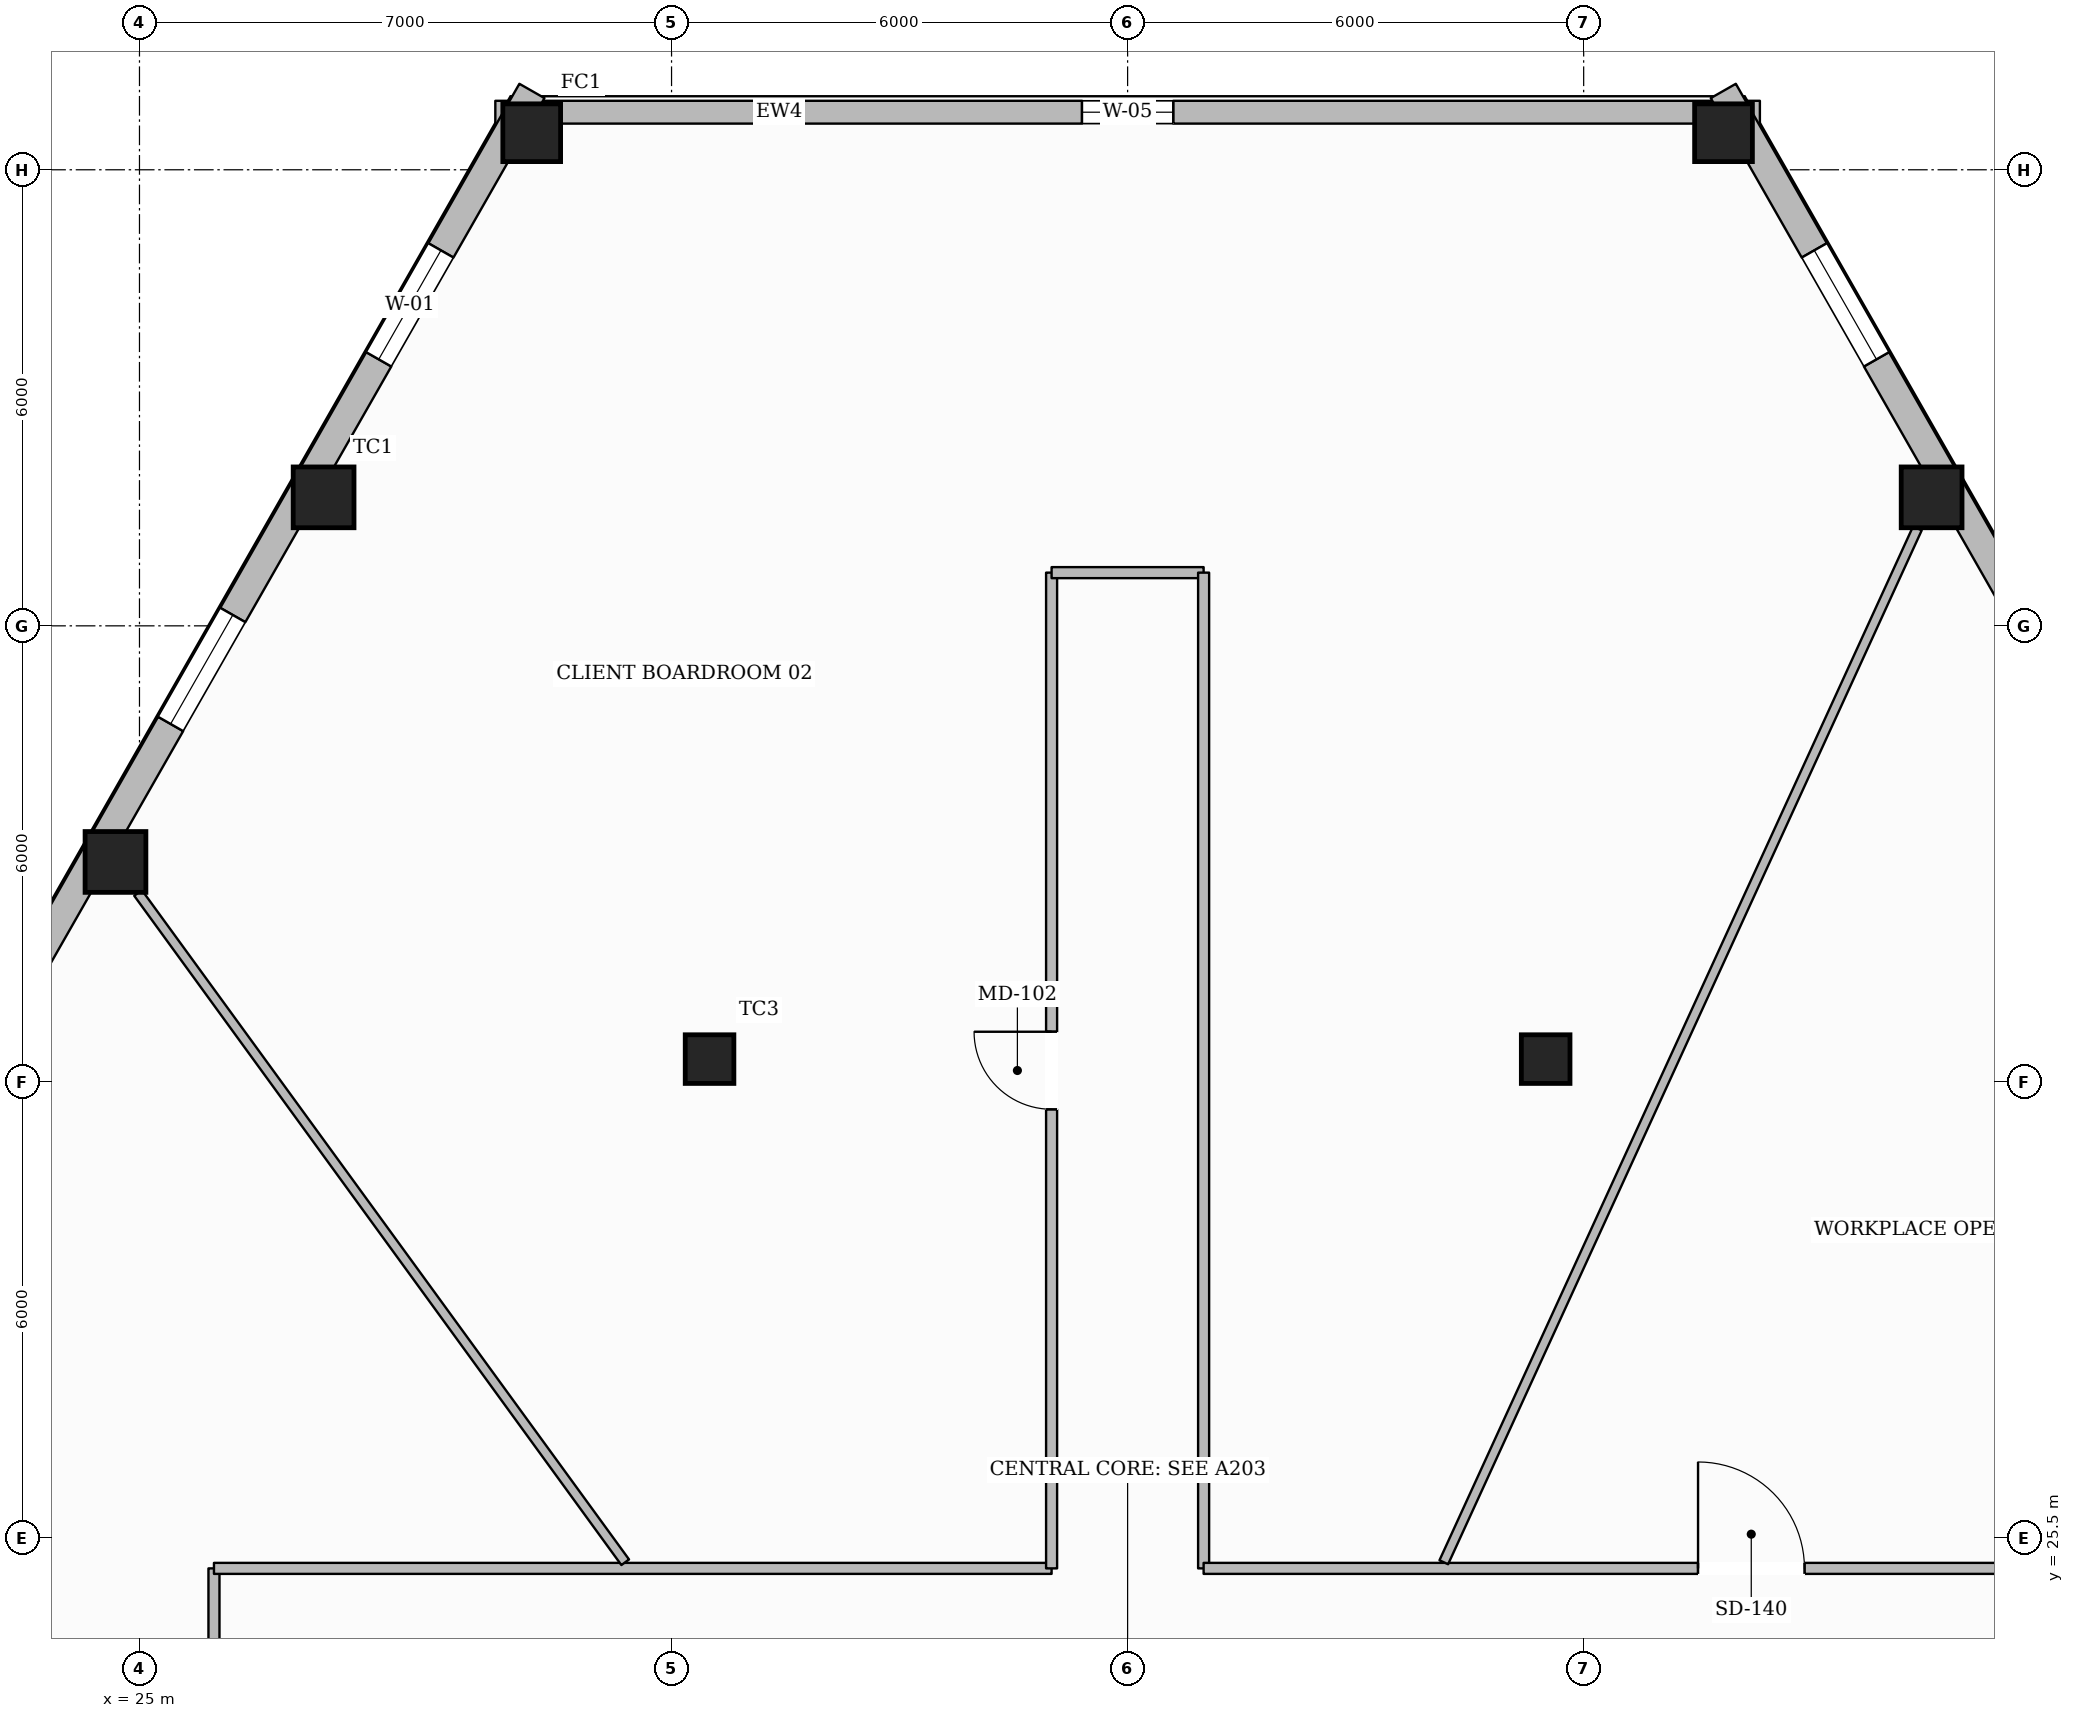
"""IFC4 building model, lengths in metres.
Left out: names, types, materials, properties, quantities, classifications, styles, units other than length and angle.
Written with IfcOpenShell. Run it as: python <this file> out.ifc"""

import sys

from ifc_helpers import new_model, si_unit, direction, frame, frame_2d, origin, origin_2d, place, context, subcontext, project, spatial, rectangle, hollow_rectangle, extrude, element, fill, save


model = new_model("IFC4")
c1 = context("Model", 3, precision=1e-05, world=origin(), true_north=direction((0.0, 1.0)))
c2 = subcontext(c1, "Body", "Model", "MODEL_VIEW")
j1 = project(units=[si_unit("LENGTHUNIT", "METRE"), si_unit("PLANEANGLEUNIT", "RADIAN")], contexts=[c1])
p1 = place(None, origin())
s1 = spatial("IfcSite", under=j1, at=p1, CompositionType="ELEMENT")
p2 = place(p1, origin())
s2 = spatial("IfcBuilding", under=s1, at=p2, CompositionType="ELEMENT")
p3 = place(p2, frame((0.0, 0.0, 29.1)))
s3 = spatial("IfcBuildingStorey", under=s2, at=p3, CompositionType="ELEMENT", Elevation=29.1)
p4 = place(p3, frame((30.16, 43.987, 0.0), z_axis=(0.0, 0.0, 1.0), x_axis=(1.0, 0.0, 0.0)))
e1 = element("IfcColumn", 1, at=p4, inside=s3, PredefinedType="COLUMN", context=c2, shape_type="SweptSolid", body=[
    extrude(hollow_rectangle(XDim=0.76, YDim=0.76, WallThickness=0.035, at=origin_2d()), origin(), (0.0, 0.0, 1.0), 3.59),
])
for number, where, z_axis, x_axis in (
    (2, (27.422, 39.19, 0.0), (0.0, 0.0, 1.0), (1.0, 0.0, 0.0)),
    (3, (24.684, 34.394, 0.0), (0.0, 0.0, 1.0), (1.0, 0.0, 0.0)),
    (4, (48.578, 39.19, 0.0), (0.0, 0.0, 1.0), (1.0, 0.0, 0.0)),
):
    element("IfcColumn", number, at=place(p3, frame(where, z_axis=z_axis, x_axis=x_axis)), inside=s3, PredefinedType="COLUMN", context=c2, shape_type="SweptSolid", body=[
        extrude(hollow_rectangle(XDim=0.8, YDim=0.8, WallThickness=0.036, at=origin_2d()), origin(), (0.0, 0.0, 1.0), 3.59),
    ])
p5 = place(p3, frame((45.84, 43.987, 0.0), z_axis=(0.0, 0.0, 1.0), x_axis=(1.0, 0.0, 0.0)))
e5 = element("IfcColumn", 5, at=p5, inside=s3, PredefinedType="COLUMN", context=c2, shape_type="SweptSolid", body=[
    extrude(hollow_rectangle(XDim=0.76, YDim=0.76, WallThickness=0.035, at=origin_2d()), origin(), (0.0, 0.0, 1.0), 3.59),
])
for number, where, z_axis, x_axis in (
    (6, (32.5, 31.8, 0.0), (0.0, 0.0, 1.0), (1.0, 0.0, 0.0)),
    (7, (43.5, 31.8, 0.0), (0.0, 0.0, 1.0), (1.0, 0.0, 0.0)),
):
    element("IfcColumn", number, at=place(p3, frame(where, z_axis=z_axis, x_axis=x_axis)), inside=s3, PredefinedType="COLUMN", context=c2, shape_type="SweptSolid", body=[
        extrude(hollow_rectangle(XDim=0.64, YDim=0.64, WallThickness=0.028, at=origin_2d()), origin(), (0.0, 0.0, 1.0), 3.59),
    ])
p6 = place(p3, frame((29.682, 44.257, 0.0), z_axis=(0.0, 0.0, 1.0), x_axis=(1.0, 0.0, 0.0)))
e8 = element("IfcWall", 8, at=p6, inside=s3, PredefinedType="STANDARD", context=c2, shape_type="SweptSolid", body=[
    extrude(rectangle(XDim=16.637, YDim=0.3, at=frame_2d((8.318, 0.0))), origin(), (0.0, 0.0, 1.0), 2.97),
])
p7 = place(p6, frame((7.719, 0.0, 0.65)))
e9 = element("IfcOpeningElement", 9, at=p7, cuts=e8, PredefinedType="OPENING", context=c2, shape_type="SweptSolid", body=[
    extrude(rectangle(XDim=1.2, YDim=1.7, at=frame_2d((0.6, 0.85))), frame((0.0, 0.16, 0.0), z_axis=(0.0, -1.0, 0.0), x_axis=(1.0, 0.0, 0.0)), (0.0, 0.0, 1.0), 0.32),
])
p8 = place(p3, frame((13.263, 14.928, 0.0), z_axis=(0.0, 0.0, 1.0), x_axis=(0.495711630902, 0.868487178367, 0.0)))
e10 = element("IfcWall", 10, at=p8, inside=s3, PredefinedType="STANDARD", context=c2, shape_type="SweptSolid", body=[
    extrude(rectangle(XDim=34.092, YDim=0.38, at=frame_2d((17.046, 0.0))), origin(), (0.0, 0.0, 1.0), 2.97),
])
p9 = place(p8, frame((30.027, 0.0, 0.65)))
e11 = element("IfcOpeningElement", 11, at=p9, cuts=e10, PredefinedType="OPENING", context=c2, shape_type="SweptSolid", body=[
    extrude(rectangle(XDim=1.65, YDim=1.75, at=frame_2d((0.825, 0.875))), frame((0.0, 0.2, 0.0), z_axis=(0.0, -1.0, 0.0), x_axis=(1.0, 0.0, 0.0)), (0.0, 0.0, 1.0), 0.4),
])
p10 = place(p8, frame((24.504, 0.0, 0.65)))
e12 = element("IfcOpeningElement", 12, at=p10, cuts=e10, PredefinedType="OPENING", context=c2, shape_type="SweptSolid", body=[
    extrude(rectangle(XDim=1.65, YDim=1.75, at=frame_2d((0.825, 0.875))), frame((0.0, 0.2, 0.0), z_axis=(0.0, -1.0, 0.0), x_axis=(1.0, 0.0, 0.0)), (0.0, 0.0, 1.0), 0.4),
])
p11 = place(p8, frame((13.457, 0.0, 0.65)))
e13 = element("IfcOpeningElement", 13, at=p11, cuts=e10, PredefinedType="OPENING", context=c2, shape_type="SweptSolid", body=[
    extrude(rectangle(XDim=1.65, YDim=1.75, at=frame_2d((0.825, 0.875))), frame((0.0, 0.2, 0.0), z_axis=(0.0, -1.0, 0.0), x_axis=(1.0, 0.0, 0.0)), (0.0, 0.0, 1.0), 0.4),
])
p12 = place(p8, frame((7.934, 0.0, 0.65)))
e14 = element("IfcOpeningElement", 14, at=p12, cuts=e10, PredefinedType="OPENING", context=c2, shape_type="SweptSolid", body=[
    extrude(rectangle(XDim=1.65, YDim=1.75, at=frame_2d((0.825, 0.875))), frame((0.0, 0.2, 0.0), z_axis=(0.0, -1.0, 0.0), x_axis=(1.0, 0.0, 0.0)), (0.0, 0.0, 1.0), 0.4),
])
p13 = place(p8, frame((2.411, 0.0, 0.65)))
e15 = element("IfcOpeningElement", 15, at=p13, cuts=e10, PredefinedType="OPENING", context=c2, shape_type="SweptSolid", body=[
    extrude(rectangle(XDim=1.65, YDim=1.75, at=frame_2d((0.825, 0.875))), frame((0.0, 0.2, 0.0), z_axis=(0.0, -1.0, 0.0), x_axis=(1.0, 0.0, 0.0)), (0.0, 0.0, 1.0), 0.4),
])
p14 = place(p3, frame((45.837, 44.537, 0.0), z_axis=(0.0, 0.0, 1.0), x_axis=(0.495711630902, -0.868487178367, 0.0)))
e16 = element("IfcWall", 16, at=p14, inside=s3, PredefinedType="STANDARD", context=c2, shape_type="SweptSolid", body=[
    extrude(rectangle(XDim=34.092, YDim=0.38, at=frame_2d((17.046, 0.0))), origin(), (0.0, 0.0, 1.0), 2.97),
])
p15 = place(p14, frame((30.031, 0.0, 0.65)))
e17 = element("IfcOpeningElement", 17, at=p15, cuts=e16, PredefinedType="OPENING", context=c2, shape_type="SweptSolid", body=[
    extrude(rectangle(XDim=1.65, YDim=1.75, at=frame_2d((0.825, 0.875))), frame((0.0, 0.2, 0.0), z_axis=(0.0, -1.0, 0.0), x_axis=(1.0, 0.0, 0.0)), (0.0, 0.0, 1.0), 0.4),
])
p16 = place(p14, frame((24.508, 0.0, 0.65)))
e18 = element("IfcOpeningElement", 18, at=p16, cuts=e16, PredefinedType="OPENING", context=c2, shape_type="SweptSolid", body=[
    extrude(rectangle(XDim=1.65, YDim=1.75, at=frame_2d((0.825, 0.875))), frame((0.0, 0.2, 0.0), z_axis=(0.0, -1.0, 0.0), x_axis=(1.0, 0.0, 0.0)), (0.0, 0.0, 1.0), 0.4),
])
p17 = place(p14, frame((13.462, 0.0, 0.65)))
e19 = element("IfcOpeningElement", 19, at=p17, cuts=e16, PredefinedType="OPENING", context=c2, shape_type="SweptSolid", body=[
    extrude(rectangle(XDim=1.65, YDim=1.75, at=frame_2d((0.825, 0.875))), frame((0.0, 0.2, 0.0), z_axis=(0.0, -1.0, 0.0), x_axis=(1.0, 0.0, 0.0)), (0.0, 0.0, 1.0), 0.4),
])
p18 = place(p14, frame((7.939, 0.0, 0.65)))
e20 = element("IfcOpeningElement", 20, at=p18, cuts=e16, PredefinedType="OPENING", context=c2, shape_type="SweptSolid", body=[
    extrude(rectangle(XDim=1.65, YDim=1.75, at=frame_2d((0.825, 0.875))), frame((0.0, 0.2, 0.0), z_axis=(0.0, -1.0, 0.0), x_axis=(1.0, 0.0, 0.0)), (0.0, 0.0, 1.0), 0.4),
])
p19 = place(p14, frame((2.415, 0.0, 0.65)))
e21 = element("IfcOpeningElement", 21, at=p19, cuts=e16, PredefinedType="OPENING", context=c2, shape_type="SweptSolid", body=[
    extrude(rectangle(XDim=1.65, YDim=1.75, at=frame_2d((0.825, 0.875))), frame((0.0, 0.2, 0.0), z_axis=(0.0, -1.0, 0.0), x_axis=(1.0, 0.0, 0.0)), (0.0, 0.0, 1.0), 0.4),
])
p20 = place(p3, frame((25.98, 9.1, 0.0), z_axis=(0.0, 0.0, 1.0), x_axis=(0.0, 1.0, 0.0)))
e22 = element("IfcWall", 22, at=p20, inside=s3, PredefinedType="PARTITIONING", context=c2, shape_type="SweptSolid", body=[
    extrude(rectangle(XDim=16.0, YDim=0.145, at=frame_2d((8.0, 0.0))), origin(), (0.0, 0.0, 1.0), 3.278),
])
p21 = place(p20, frame((10.491, 0.0, 0.0)))
e23 = element("IfcOpeningElement", 23, at=p21, cuts=e22, PredefinedType="OPENING", context=c2, shape_type="SweptSolid", body=[
    extrude(rectangle(XDim=1.4, YDim=2.2, at=frame_2d((0.7, 1.1))), frame((0.0, 0.083, 0.0), z_axis=(0.0, -1.0, 0.0), x_axis=(1.0, 0.0, 0.0)), (0.0, 0.0, 1.0), 0.165),
])
p22 = place(p20, frame((2.663, 0.0, 0.0)))
e24 = element("IfcOpeningElement", 24, at=p22, cuts=e22, PredefinedType="OPENING", context=c2, shape_type="SweptSolid", body=[
    extrude(rectangle(XDim=1.4, YDim=2.2, at=frame_2d((0.7, 1.1))), frame((0.0, 0.083, 0.0), z_axis=(0.0, -1.0, 0.0), x_axis=(1.0, 0.0, 0.0)), (0.0, 0.0, 1.0), 0.165),
])
p23 = place(p3, frame((25.98, 25.1, 0.0), z_axis=(0.0, 0.0, 1.0), x_axis=(1.0, 0.0, 0.0)))
e25 = element("IfcWall", 25, at=p23, inside=s3, PredefinedType="PARTITIONING", context=c2, shape_type="SweptSolid", body=[
    extrude(rectangle(XDim=11.02, YDim=0.145, at=frame_2d((5.51, 0.0))), origin(), (0.0, 0.0, 1.0), 3.59),
])
p24 = place(p3, frame((37.0, 25.1, 0.0), z_axis=(0.0, 0.0, 1.0), x_axis=(0.0, 1.0, 0.0)))
e26 = element("IfcWall", 26, at=p24, inside=s3, PredefinedType="PARTITIONING", context=c2, shape_type="SweptSolid", body=[
    extrude(rectangle(XDim=13.1, YDim=0.145, at=frame_2d((6.55, 0.0))), origin(), (0.0, 0.0, 1.0), 3.59),
])
p25 = place(p24, frame((6.04, 0.0, 0.0)))
e27 = element("IfcOpeningElement", 27, at=p25, cuts=e26, PredefinedType="OPENING", context=c2, shape_type="SweptSolid", body=[
    extrude(rectangle(XDim=1.02, YDim=2.15, at=frame_2d((0.51, 1.075))), frame((0.0, 0.083, 0.0), z_axis=(0.0, -1.0, 0.0), x_axis=(1.0, 0.0, 0.0)), (0.0, 0.0, 1.0), 0.165),
])
p26 = place(p3, frame((37.0, 38.2, 0.0), z_axis=(0.0, 0.0, 1.0), x_axis=(1.0, 0.0, 0.0)))
e28 = element("IfcWall", 28, at=p26, inside=s3, PredefinedType="PARTITIONING", context=c2, shape_type="SweptSolid", body=[
    extrude(rectangle(XDim=2.0, YDim=0.145, at=frame_2d((1.0, 0.0))), origin(), (0.0, 0.0, 1.0), 3.59),
])
p27 = place(p3, frame((39.0, 38.2, 0.0), z_axis=(0.0, 0.0, 1.0), x_axis=(0.0, -1.0, 0.0)))
e29 = element("IfcWall", 29, at=p27, inside=s3, PredefinedType="PARTITIONING", context=c2, shape_type="SweptSolid", body=[
    extrude(rectangle(XDim=13.1, YDim=0.145, at=frame_2d((6.55, 0.0))), origin(), (0.0, 0.0, 1.0), 3.59),
])
p28 = place(p3, frame((39.0, 25.1, 0.0), z_axis=(0.0, 0.0, 1.0), x_axis=(1.0, 0.0, 0.0)))
e30 = element("IfcWall", 30, at=p28, inside=s3, PredefinedType="PARTITIONING", context=c2, shape_type="SweptSolid", body=[
    extrude(rectangle(XDim=11.02, YDim=0.145, at=frame_2d((5.51, 0.0))), origin(), (0.0, 0.0, 1.0), 3.59),
])
p29 = place(p28, frame((6.505, 0.0, 0.0)))
e31 = element("IfcOpeningElement", 31, at=p29, cuts=e30, PredefinedType="OPENING", context=c2, shape_type="SweptSolid", body=[
    extrude(rectangle(XDim=1.4, YDim=2.2, at=frame_2d((0.7, 1.1))), frame((0.0, 0.083, 0.0), z_axis=(0.0, -1.0, 0.0), x_axis=(1.0, 0.0, 0.0)), (0.0, 0.0, 1.0), 0.165),
])
p30 = place(p3, frame((42.16, 25.18, 0.0), z_axis=(0.0, 0.0, 1.0), x_axis=(0.416471526835, 0.90914875974, 0.0)))
e32 = element("IfcWall", 32, at=p30, inside=s3, PredefinedType="PARTITIONING", context=c2, shape_type="SweptSolid", body=[
    extrude(rectangle(XDim=14.961, YDim=0.125, at=frame_2d((7.481, 0.0))), origin(), (0.0, 0.0, 1.0), 3.057),
])
p31 = place(p3, frame((31.39, 25.18, 0.0), z_axis=(0.0, 0.0, 1.0), x_axis=(-0.588482227792, 0.808510153043, 0.0)))
e33 = element("IfcWall", 33, at=p31, inside=s3, PredefinedType="PARTITIONING", context=c2, shape_type="SweptSolid", body=[
    extrude(rectangle(XDim=10.891, YDim=0.125, at=frame_2d((5.445, 0.0))), origin(), (0.0, 0.0, 1.0), 3.057),
])
p32 = place(p9, origin())
e34 = element("IfcWindow", 34, at=p32, inside=s3, PartitioningType="SINGLE_PANEL", PredefinedType="WINDOW", context=c2, shape_type="SweptSolid", body=[
    extrude(rectangle(XDim=1.65, YDim=1.75, at=frame_2d((0.825, 0.875))), frame((0.0, 0.03, 0.0), z_axis=(0.0, -1.0, 0.0), x_axis=(1.0, 0.0, 0.0)), (0.0, 0.0, 1.0), 0.06),
])
fill(e11, e34)
p33 = place(p10, origin())
e35 = element("IfcWindow", 35, at=p33, inside=s3, PartitioningType="SINGLE_PANEL", PredefinedType="WINDOW", context=c2, shape_type="SweptSolid", body=[
    extrude(rectangle(XDim=1.65, YDim=1.75, at=frame_2d((0.825, 0.875))), frame((0.0, 0.03, 0.0), z_axis=(0.0, -1.0, 0.0), x_axis=(1.0, 0.0, 0.0)), (0.0, 0.0, 1.0), 0.06),
])
fill(e12, e35)
p34 = place(p19, origin())
e36 = element("IfcWindow", 36, at=p34, inside=s3, PartitioningType="SINGLE_PANEL", PredefinedType="WINDOW", context=c2, shape_type="SweptSolid", body=[
    extrude(rectangle(XDim=1.65, YDim=1.75, at=frame_2d((0.825, 0.875))), frame((0.0, 0.03, 0.0), z_axis=(0.0, -1.0, 0.0), x_axis=(1.0, 0.0, 0.0)), (0.0, 0.0, 1.0), 0.06),
])
fill(e21, e36)
p35 = place(p7, origin())
e37 = element("IfcWindow", 37, at=p35, inside=s3, PartitioningType="SINGLE_PANEL", PredefinedType="WINDOW", context=c2, shape_type="SweptSolid", body=[
    extrude(rectangle(XDim=1.2, YDim=1.7, at=frame_2d((0.6, 0.85))), frame((0.0, 0.03, 0.0), z_axis=(0.0, -1.0, 0.0), x_axis=(1.0, 0.0, 0.0)), (0.0, 0.0, 1.0), 0.06),
])
fill(e9, e37)
p36 = place(p29, origin())
e38 = element("IfcDoor", 38, at=p36, inside=s3, OperationType="SINGLE_SWING_LEFT", PredefinedType="DOOR", context=c2, shape_type="SweptSolid", body=[
    extrude(rectangle(XDim=1.4, YDim=2.2, at=frame_2d((0.7, 1.1))), frame((0.0, 0.025, 0.0), z_axis=(0.0, -1.0, 0.0), x_axis=(1.0, 0.0, 0.0)), (0.0, 0.0, 1.0), 0.05),
])
fill(e31, e38)
p37 = place(p25, origin())
e39 = element("IfcDoor", 39, at=p37, inside=s3, OperationType="SINGLE_SWING_RIGHT", PredefinedType="DOOR", context=c2, shape_type="SweptSolid", body=[
    extrude(rectangle(XDim=1.02, YDim=2.15, at=frame_2d((0.51, 1.075))), frame((0.0, 0.025, 0.0), z_axis=(0.0, -1.0, 0.0), x_axis=(1.0, 0.0, 0.0)), (0.0, 0.0, 1.0), 0.05),
])
fill(e27, e39)
save(model, sys.argv[1])
